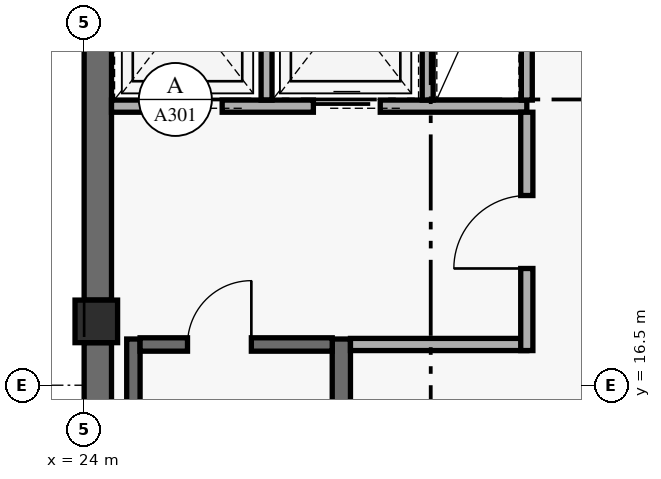
"""IFC4 building model, lengths in metres.
Left out: names, types, materials, properties, quantities, classifications, styles, units other than length and angle.
Written with IfcOpenShell. Run it as: python <this file> out.ifc"""

import sys

from ifc_helpers import new_model, si_unit, direction, frame, frame_2d, origin, origin_2d, place, context, subcontext, project, spatial, rectangle, extrude, element, fill, save


model = new_model("IFC4")
c1 = context("Model", 3, precision=1e-05, world=origin(), true_north=direction((0.0, 1.0)))
c2 = subcontext(c1, "Body", "Model", "MODEL_VIEW")
j1 = project(units=[si_unit("LENGTHUNIT", "METRE"), si_unit("PLANEANGLEUNIT", "RADIAN")], contexts=[c1])
p1 = place(None, origin())
s1 = spatial("IfcSite", under=j1, at=p1, CompositionType="ELEMENT")
p2 = place(p1, origin())
s2 = spatial("IfcBuilding", under=s1, at=p2, CompositionType="ELEMENT")
p3 = place(p2, frame((0.0, 0.0, 274.8)))
s3 = spatial("IfcBuildingStorey", under=s2, at=p3, CompositionType="ELEMENT", Elevation=274.8)
p4 = place(p3, frame((24.225, 9.6, 0.0), z_axis=(0.0, 0.0, 1.0), x_axis=(0.0, 1.0, 0.0)))
e1 = element("IfcWall", 1, at=p4, inside=s3, PredefinedType="SHEAR", context=c2, shape_type="SweptSolid", body=[
    extrude(rectangle(XDim=7.6, YDim=0.45, at=frame_2d((3.8, 0.0))), origin(), (0.0, 0.0, 1.0), 2.821),
])
p5 = place(p3, frame((24.225, 17.9, 0.0), z_axis=(0.0, 0.0, 1.0), x_axis=(0.0, 1.0, 0.0)))
e2 = element("IfcWall", 2, at=p5, inside=s3, PredefinedType="SHEAR", context=c2, shape_type="SweptSolid", body=[
    extrude(rectangle(XDim=11.95, YDim=0.45, at=frame_2d((5.975, 0.0))), origin(), (0.0, 0.0, 1.0), 2.821),
])
p6 = place(p3, frame((24.81, 9.5, 0.0), z_axis=(0.0, 0.0, 1.0), x_axis=(0.0, 1.0, 0.0)))
e3 = element("IfcWall", 3, at=p6, inside=s3, PredefinedType="SHEAR", context=c2, shape_type="SweptSolid", body=[
    extrude(rectangle(XDim=7.76, YDim=0.22, at=frame_2d((3.88, 0.0))), origin(), (0.0, 0.0, 1.0), 3.36),
])
p7 = place(p3, frame((28.23, 9.5, 0.0), z_axis=(0.0, 0.0, 1.0), x_axis=(0.0, 1.0, 0.0)))
e4 = element("IfcWall", 4, at=p7, inside=s3, PredefinedType="SHEAR", context=c2, shape_type="SweptSolid", body=[
    extrude(rectangle(XDim=7.76, YDim=0.3, at=frame_2d((3.88, 0.0))), origin(), (0.0, 0.0, 1.0), 3.36),
])
p8 = place(p3, frame((24.92, 17.17, 0.0), z_axis=(0.0, 0.0, 1.0), x_axis=(1.0, 0.0, 0.0)))
e5 = element("IfcWall", 5, at=p8, inside=s3, PredefinedType="SHEAR", context=c2, shape_type="SweptSolid", body=[
    extrude(rectangle(XDim=3.16, YDim=0.22, at=frame_2d((1.58, 0.0))), origin(), (0.0, 0.0, 1.0), 3.36),
])
p9 = place(p8, frame((0.78, 0.0, 0.0)))
e6 = element("IfcOpeningElement", 6, at=p9, cuts=e5, PredefinedType="OPENING", context=c2, shape_type="SweptSolid", body=[
    extrude(rectangle(XDim=1.05, YDim=2.15, at=frame_2d((0.525, 1.075))), frame((0.0, 0.12, 0.0), z_axis=(0.0, -1.0, 0.0), x_axis=(1.0, 0.0, 0.0)), (0.0, 0.0, 1.0), 0.24),
])
p10 = place(p3, frame((24.2, 17.55, 0.0), z_axis=(0.0, 0.0, 1.0), x_axis=(1.0, 0.0, 0.0)))
e7 = element("IfcColumn", 7, at=p10, inside=s3, PredefinedType="COLUMN", context=c2, shape_type="SweptSolid", body=[
    extrude(rectangle(XDim=0.7, YDim=0.7, at=origin_2d()), origin(), (0.0, 0.0, 1.0), 3.6),
])
p11 = place(p3, frame((24.45, 21.09, 0.0), z_axis=(0.0, 0.0, 1.0), x_axis=(1.0, 0.0, 0.0)))
e8 = element("IfcWall", 8, at=p11, inside=s3, PredefinedType="STANDARD", context=c2, shape_type="SweptSolid", body=[
    extrude(rectangle(XDim=6.83, YDim=0.2, at=frame_2d((3.415, 0.0))), origin(), (0.0, 0.0, 1.0), 3.36),
])
p12 = place(p11, frame((0.72, 0.0, 0.0)))
e9 = element("IfcOpeningElement", 9, at=p12, cuts=e8, PredefinedType="OPENING", context=c2, shape_type="SweptSolid", body=[
    extrude(rectangle(XDim=1.1, YDim=2.2, at=frame_2d((0.55, 1.1))), frame((0.0, 0.11, 0.0), z_axis=(0.0, -1.0, 0.0), x_axis=(1.0, 0.0, 0.0)), (0.0, 0.0, 1.0), 0.22),
])
p13 = place(p11, frame((3.32, 0.0, 0.0)))
e10 = element("IfcOpeningElement", 10, at=p13, cuts=e8, PredefinedType="OPENING", context=c2, shape_type="SweptSolid", body=[
    extrude(rectangle(XDim=1.1, YDim=2.2, at=frame_2d((0.55, 1.1))), frame((0.0, 0.11, 0.0), z_axis=(0.0, -1.0, 0.0), x_axis=(1.0, 0.0, 0.0)), (0.0, 0.0, 1.0), 0.22),
])
p14 = place(p3, frame((28.38, 17.17, 0.0), z_axis=(0.0, 0.0, 1.0), x_axis=(1.0, 0.0, 0.0)))
e11 = element("IfcWall", 11, at=p14, inside=s3, PredefinedType="STANDARD", context=c2, shape_type="SweptSolid", body=[
    extrude(rectangle(XDim=2.9, YDim=0.2, at=frame_2d((1.45, 0.0))), origin(), (0.0, 0.0, 1.0), 3.36),
])
p15 = place(p3, frame((31.28, 17.07, 0.0), z_axis=(0.0, 0.0, 1.0), x_axis=(0.0, 1.0, 0.0)))
e12 = element("IfcWall", 12, at=p15, inside=s3, PredefinedType="STANDARD", context=c2, shape_type="SweptSolid", body=[
    extrude(rectangle(XDim=3.92, YDim=0.2, at=frame_2d((1.96, 0.0))), origin(), (0.0, 0.0, 1.0), 2.803),
])
p16 = place(p15, frame((1.35, 0.0, 0.0)))
e13 = element("IfcOpeningElement", 13, at=p16, cuts=e12, PredefinedType="OPENING", context=c2, shape_type="SweptSolid", body=[
    extrude(rectangle(XDim=1.2, YDim=2.15, at=frame_2d((0.6, 1.075))), frame((0.0, 0.11, 0.0), z_axis=(0.0, -1.0, 0.0), x_axis=(1.0, 0.0, 0.0)), (0.0, 0.0, 1.0), 0.22),
])
p17 = place(p3, frame((27.0, 21.19, 0.0), z_axis=(0.0, 0.0, 1.0), x_axis=(0.0, 1.0, 0.0)))
e14 = element("IfcWall", 14, at=p17, inside=s3, PredefinedType="STANDARD", context=c2, shape_type="SweptSolid", body=[
    extrude(rectangle(XDim=3.11, YDim=0.18, at=frame_2d((1.555, 0.0))), origin(), (0.0, 0.0, 1.0), 3.36),
])
for number, where, z_axis, x_axis in (
    (15, (29.65, 21.19, 0.0), (0.0, 0.0, 1.0), (0.0, 1.0, 0.0)),
    (16, (31.28, 21.19, 0.0), (0.0, 0.0, 1.0), (0.0, 1.0, 0.0)),
):
    element("IfcWall", number, at=place(p3, frame(where, z_axis=z_axis, x_axis=x_axis)), inside=s3, PredefinedType="STANDARD", context=c2, shape_type="SweptSolid", body=[
        extrude(rectangle(XDim=3.02, YDim=0.18, at=frame_2d((1.51, 0.0))), origin(), (0.0, 0.0, 1.0), 3.36),
    ])
p18 = place(p9, frame((1.05, 0.0, 0.0), z_axis=(0.0, 0.0, 1.0), x_axis=(-1.0, 0.0, 0.0)))
e17 = element("IfcDoor", 17, at=p18, inside=s3, OperationType="SINGLE_SWING_LEFT", PredefinedType="DOOR", context=c2, shape_type="SweptSolid", body=[
    extrude(rectangle(XDim=1.05, YDim=2.15, at=frame_2d((0.525, 1.075))), frame((0.0, 0.025, 0.0), z_axis=(0.0, -1.0, 0.0), x_axis=(1.0, 0.0, 0.0)), (0.0, 0.0, 1.0), 0.05),
])
fill(e6, e17)
p19 = place(p12, origin())
e18 = element("IfcDoor", 18, at=p19, inside=s3, OperationType="SLIDING_TO_LEFT", PredefinedType="DOOR", context=c2, shape_type="SweptSolid", body=[
    extrude(rectangle(XDim=1.1, YDim=2.2, at=frame_2d((0.55, 1.1))), frame((0.0, 0.025, 0.0), z_axis=(0.0, -1.0, 0.0), x_axis=(1.0, 0.0, 0.0)), (0.0, 0.0, 1.0), 0.05),
])
fill(e9, e18)
p20 = place(p13, origin())
e19 = element("IfcDoor", 19, at=p20, inside=s3, OperationType="SLIDING_TO_LEFT", PredefinedType="DOOR", context=c2, shape_type="SweptSolid", body=[
    extrude(rectangle(XDim=1.1, YDim=2.2, at=frame_2d((0.55, 1.1))), frame((0.0, 0.025, 0.0), z_axis=(0.0, -1.0, 0.0), x_axis=(1.0, 0.0, 0.0)), (0.0, 0.0, 1.0), 0.05),
])
fill(e10, e19)
p21 = place(p16, origin())
e20 = element("IfcDoor", 20, at=p21, inside=s3, OperationType="SINGLE_SWING_LEFT", PredefinedType="DOOR", context=c2, shape_type="SweptSolid", body=[
    extrude(rectangle(XDim=1.2, YDim=2.15, at=frame_2d((0.6, 1.075))), frame((0.0, 0.025, 0.0), z_axis=(0.0, -1.0, 0.0), x_axis=(1.0, 0.0, 0.0)), (0.0, 0.0, 1.0), 0.05),
])
fill(e13, e20)
save(model, sys.argv[1])
